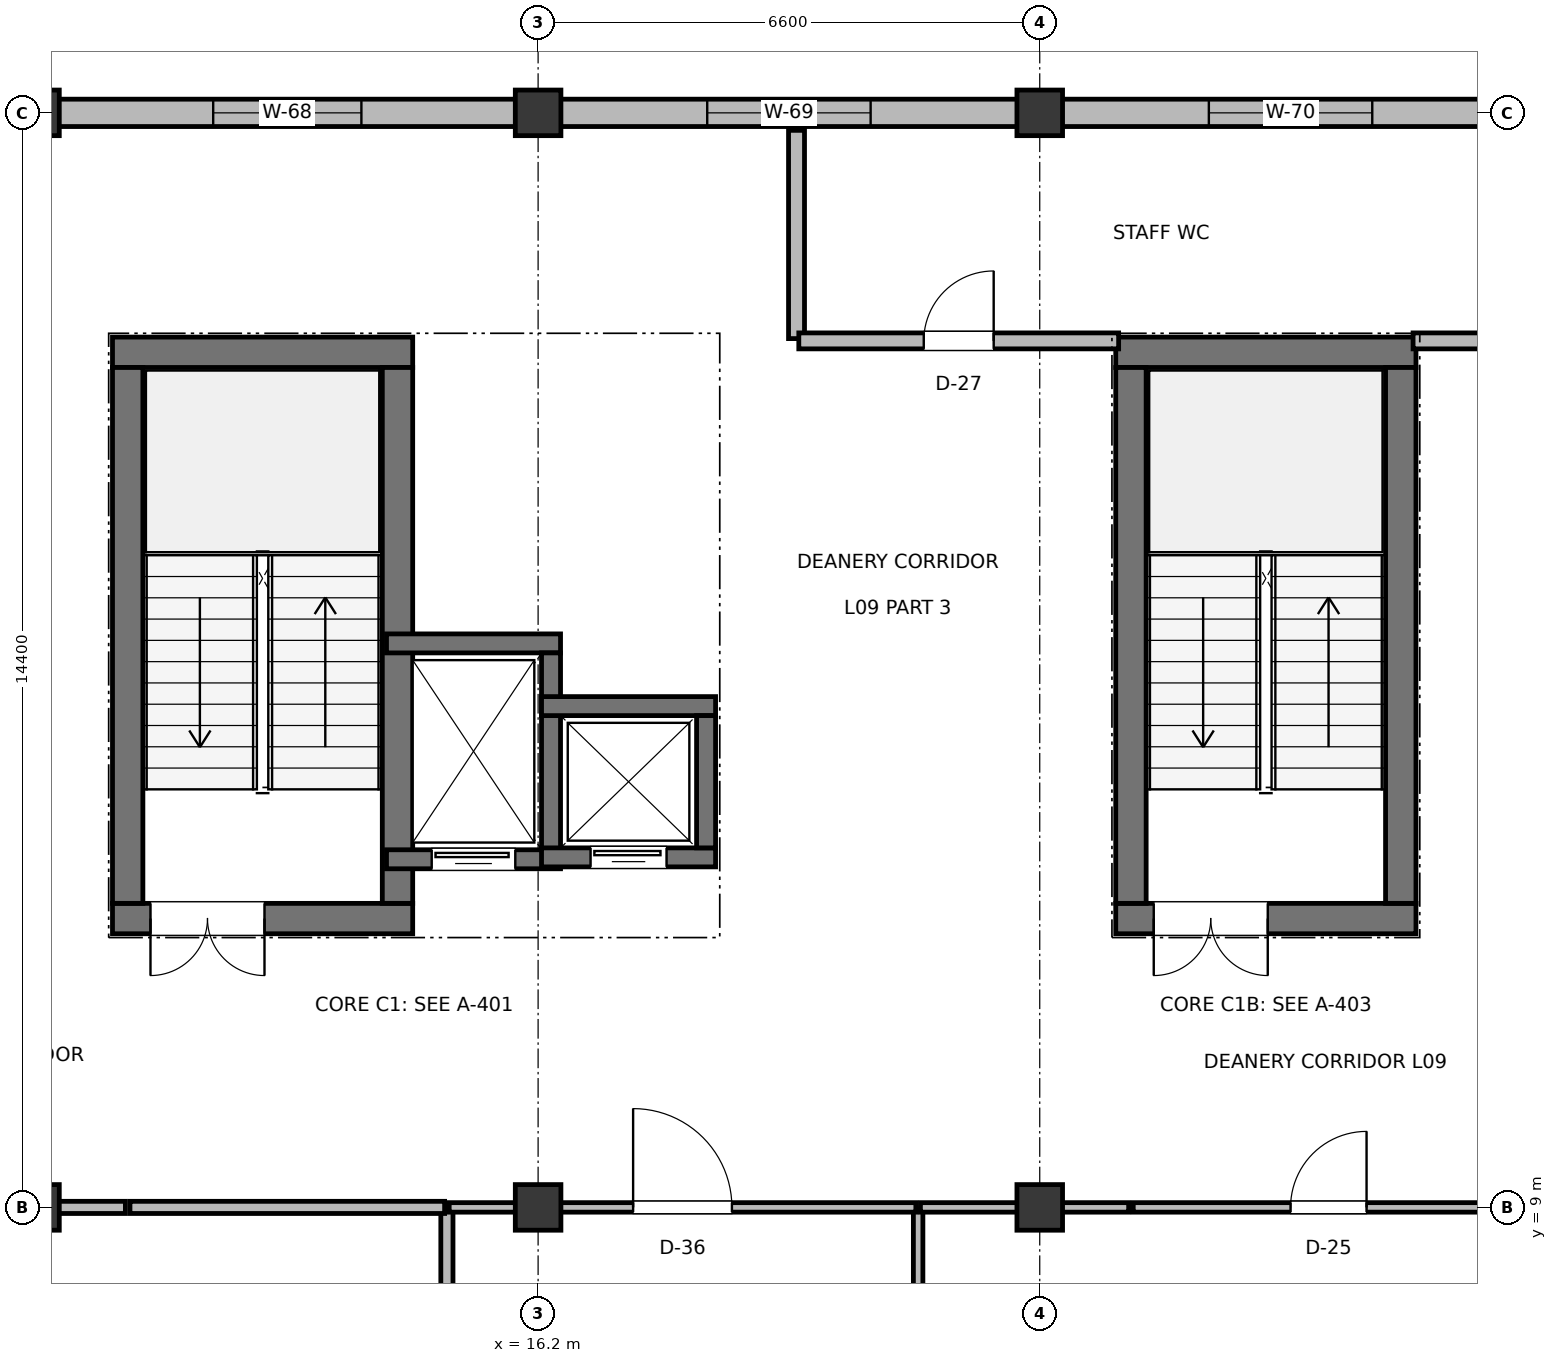
"""IFC4 building model, lengths in metres.
Left out: names, types, materials, properties, quantities, classifications, styles, units other than length and angle.
Written with IfcOpenShell. Run it as: python <this file> out.ifc"""

import sys

from ifc_helpers import new_model, si_unit, direction, frame, frame_2d, origin, origin_2d, place, context, subcontext, project, spatial, rectangle, extrude, element, fill, save


model = new_model("IFC4")
c1 = context("Model", 3, precision=1e-05, world=origin(), true_north=direction((0.0, 1.0)))
c2 = subcontext(c1, "Body", "Model", "MODEL_VIEW")
j1 = project(units=[si_unit("LENGTHUNIT", "METRE"), si_unit("PLANEANGLEUNIT", "RADIAN")], contexts=[c1])
p1 = place(None, origin())
s1 = spatial("IfcSite", under=j1, at=p1, CompositionType="ELEMENT")
p2 = place(p1, origin())
s2 = spatial("IfcBuilding", under=s1, at=p2, CompositionType="ELEMENT")
p3 = place(p2, frame((0.0, 0.0, 40.6)))
s3 = spatial("IfcBuildingStorey", under=s2, at=p3, CompositionType="ELEMENT", Elevation=40.6)
for number, where, z_axis, x_axis in (
    (1, (9.6, 9.0, 0.0), (0.0, 0.0, 1.0), (1.0, 0.0, 0.0)),
    (2, (9.6, 23.4, 0.0), (0.0, 0.0, 1.0), (1.0, 0.0, 0.0)),
    (3, (16.2, 9.0, 0.0), (0.0, 0.0, 1.0), (1.0, 0.0, 0.0)),
    (4, (16.2, 23.4, 0.0), (0.0, 0.0, 1.0), (1.0, 0.0, 0.0)),
    (5, (22.8, 9.0, 0.0), (0.0, 0.0, 1.0), (1.0, 0.0, 0.0)),
    (6, (22.8, 23.4, 0.0), (0.0, 0.0, 1.0), (1.0, 0.0, 0.0)),
):
    element("IfcColumn", number, at=place(p3, frame(where, z_axis=z_axis, x_axis=x_axis)), inside=s3, PredefinedType="COLUMN", context=c2, shape_type="SweptSolid", body=[
        extrude(rectangle(XDim=0.6, YDim=0.6, at=origin_2d()), origin(), (0.0, 0.0, 1.0), 4.0),
    ])
p4 = place(p3, frame((9.885, 23.4, 0.0), z_axis=(0.0, 0.0, 1.0), x_axis=(1.0, 0.0, 0.0)))
e7 = element("IfcWall", 7, at=p4, inside=s3, PredefinedType="SOLIDWALL", context=c2, shape_type="SweptSolid", body=[
    extrude(rectangle(XDim=6.03, YDim=0.36, at=frame_2d((3.015, 0.0))), origin(), (0.0, 0.0, 1.0), 2.995),
])
p5 = place(p4, frame((2.04, 0.0, 0.9)))
e8 = element("IfcOpeningElement", 8, at=p5, cuts=e7, PredefinedType="OPENING", context=c2, shape_type="SweptSolid", body=[
    extrude(rectangle(XDim=1.95, YDim=1.75, at=frame_2d((0.975, 0.875))), frame((0.0, 0.19, 0.0), z_axis=(0.0, -1.0, 0.0), x_axis=(1.0, 0.0, 0.0)), (0.0, 0.0, 1.0), 0.38),
])
p6 = place(p3, frame((16.485, 23.4, 0.0), z_axis=(0.0, 0.0, 1.0), x_axis=(1.0, 0.0, 0.0)))
e9 = element("IfcWall", 9, at=p6, inside=s3, PredefinedType="SOLIDWALL", context=c2, shape_type="SweptSolid", body=[
    extrude(rectangle(XDim=6.03, YDim=0.36, at=frame_2d((3.015, 0.0))), origin(), (0.0, 0.0, 1.0), 2.825),
])
p7 = place(p6, frame((1.94, 0.0, 0.9)))
e10 = element("IfcOpeningElement", 10, at=p7, cuts=e9, PredefinedType="OPENING", context=c2, shape_type="SweptSolid", body=[
    extrude(rectangle(XDim=2.15, YDim=1.15, at=frame_2d((1.075, 0.575))), frame((0.0, 0.19, 0.0), z_axis=(0.0, -1.0, 0.0), x_axis=(1.0, 0.0, 0.0)), (0.0, 0.0, 1.0), 0.38),
])
p8 = place(p3, frame((23.085, 23.4, 0.0), z_axis=(0.0, 0.0, 1.0), x_axis=(1.0, 0.0, 0.0)))
e11 = element("IfcWall", 11, at=p8, inside=s3, PredefinedType="SOLIDWALL", context=c2, shape_type="SweptSolid", body=[
    extrude(rectangle(XDim=6.03, YDim=0.36, at=frame_2d((3.015, 0.0))), origin(), (0.0, 0.0, 1.0), 2.995),
])
p9 = place(p8, frame((1.94, 0.0, 0.9)))
e12 = element("IfcOpeningElement", 12, at=p9, cuts=e11, PredefinedType="OPENING", context=c2, shape_type="SweptSolid", body=[
    extrude(rectangle(XDim=2.15, YDim=1.35, at=frame_2d((1.075, 0.675))), frame((0.0, 0.19, 0.0), z_axis=(0.0, -1.0, 0.0), x_axis=(1.0, 0.0, 0.0)), (0.0, 0.0, 1.0), 0.38),
])
p10 = place(p3, frame((10.6, 12.8, 0.0), z_axis=(0.0, 0.0, 1.0), x_axis=(1.0, 0.0, 0.0)))
e13 = element("IfcWall", 13, at=p10, inside=s3, PredefinedType="SHEAR", context=c2, shape_type="SweptSolid", body=[
    extrude(rectangle(XDim=3.95, YDim=0.4, at=frame_2d((1.975, 0.0))), origin(), (0.0, 0.0, 1.0), 3.78),
])
p11 = place(p10, frame((0.5, 0.0, 0.0)))
e14 = element("IfcOpeningElement", 14, at=p11, cuts=e13, PredefinedType="OPENING", context=c2, shape_type="SweptSolid", body=[
    extrude(rectangle(XDim=1.5, YDim=2.2, at=frame_2d((0.75, 1.1))), frame((0.0, 0.21, 0.0), z_axis=(0.0, -1.0, 0.0), x_axis=(1.0, 0.0, 0.0)), (0.0, 0.0, 1.0), 0.42),
])
p12 = place(p3, frame((10.6, 20.25, 0.0), z_axis=(0.0, 0.0, 1.0), x_axis=(1.0, 0.0, 0.0)))
e15 = element("IfcWall", 15, at=p12, inside=s3, PredefinedType="SHEAR", context=c2, shape_type="SweptSolid", body=[
    extrude(rectangle(XDim=3.95, YDim=0.4, at=frame_2d((1.975, 0.0))), origin(), (0.0, 0.0, 1.0), 3.78),
])
for number, where, z_axis, x_axis in (
    (16, (10.8, 13.0, 0.0), (0.0, 0.0, 1.0), (0.0, 1.0, 0.0)),
    (17, (14.35, 13.0, 0.0), (0.0, 0.0, 1.0), (0.0, 1.0, 0.0)),
):
    element("IfcWall", number, at=place(p3, frame(where, z_axis=z_axis, x_axis=x_axis)), inside=s3, PredefinedType="SHEAR", context=c2, shape_type="SweptSolid", body=[
        extrude(rectangle(XDim=7.05, YDim=0.4, at=frame_2d((3.525, 0.0))), origin(), (0.0, 0.0, 1.0), 3.78),
    ])
p13 = place(p3, frame((14.205, 13.58, 0.0), z_axis=(0.0, 0.0, 1.0), x_axis=(1.0, 0.0, 0.0)))
e18 = element("IfcWall", 18, at=p13, inside=s3, PredefinedType="SHEAR", context=c2, shape_type="SweptSolid", body=[
    extrude(rectangle(XDim=2.29, YDim=0.25, at=frame_2d((1.145, 0.0))), origin(), (0.0, 0.0, 1.0), 3.76),
])
p14 = place(p13, frame((0.595, 0.0, 0.0)))
e19 = element("IfcOpeningElement", 19, at=p14, cuts=e18, PredefinedType="OPENING", context=c2, shape_type="SweptSolid", body=[
    extrude(rectangle(XDim=1.1, YDim=2.2, at=frame_2d((0.55, 1.1))), frame((0.0, 0.135, 0.0), z_axis=(0.0, -1.0, 0.0), x_axis=(1.0, 0.0, 0.0)), (0.0, 0.0, 1.0), 0.27),
])
p15 = place(p3, frame((14.205, 16.42, 0.0), z_axis=(0.0, 0.0, 1.0), x_axis=(1.0, 0.0, 0.0)))
e20 = element("IfcWall", 20, at=p15, inside=s3, PredefinedType="SHEAR", context=c2, shape_type="SweptSolid", body=[
    extrude(rectangle(XDim=2.29, YDim=0.25, at=frame_2d((1.145, 0.0))), origin(), (0.0, 0.0, 1.0), 3.76),
])
p16 = place(p3, frame((16.37, 13.705, 0.0), z_axis=(0.0, 0.0, 1.0), x_axis=(0.0, 1.0, 0.0)))
e21 = element("IfcWall", 21, at=p16, inside=s3, PredefinedType="SHEAR", context=c2, shape_type="SweptSolid", body=[
    extrude(rectangle(XDim=2.59, YDim=0.25, at=frame_2d((1.295, 0.0))), origin(), (0.0, 0.0, 1.0), 3.76),
])
p17 = place(p3, frame((16.245, 13.605, 0.0), z_axis=(0.0, 0.0, 1.0), x_axis=(1.0, 0.0, 0.0)))
e22 = element("IfcWall", 22, at=p17, inside=s3, PredefinedType="SHEAR", context=c2, shape_type="SweptSolid", body=[
    extrude(rectangle(XDim=2.29, YDim=0.25, at=frame_2d((1.145, 0.0))), origin(), (0.0, 0.0, 1.0), 3.76),
])
p18 = place(p17, frame((0.645, 0.0, 0.0)))
e23 = element("IfcOpeningElement", 23, at=p18, cuts=e22, PredefinedType="OPENING", context=c2, shape_type="SweptSolid", body=[
    extrude(rectangle(XDim=1.0, YDim=2.15, at=frame_2d((0.5, 1.075))), frame((0.0, 0.135, 0.0), z_axis=(0.0, -1.0, 0.0), x_axis=(1.0, 0.0, 0.0)), (0.0, 0.0, 1.0), 0.27),
])
p19 = place(p3, frame((16.245, 15.595, 0.0), z_axis=(0.0, 0.0, 1.0), x_axis=(1.0, 0.0, 0.0)))
e24 = element("IfcWall", 24, at=p19, inside=s3, PredefinedType="SHEAR", context=c2, shape_type="SweptSolid", body=[
    extrude(rectangle(XDim=2.29, YDim=0.25, at=frame_2d((1.145, 0.0))), origin(), (0.0, 0.0, 1.0), 3.76),
])
p20 = place(p3, frame((18.41, 13.73, 0.0), z_axis=(0.0, 0.0, 1.0), x_axis=(0.0, 1.0, 0.0)))
e25 = element("IfcWall", 25, at=p20, inside=s3, PredefinedType="SHEAR", context=c2, shape_type="SweptSolid", body=[
    extrude(rectangle(XDim=1.74, YDim=0.25, at=frame_2d((0.87, 0.0))), origin(), (0.0, 0.0, 1.0), 3.76),
])
p21 = place(p3, frame((23.8, 12.8, 0.0), z_axis=(0.0, 0.0, 1.0), x_axis=(1.0, 0.0, 0.0)))
e26 = element("IfcWall", 26, at=p21, inside=s3, PredefinedType="SHEAR", context=c2, shape_type="SweptSolid", body=[
    extrude(rectangle(XDim=3.95, YDim=0.4, at=frame_2d((1.975, 0.0))), origin(), (0.0, 0.0, 1.0), 3.78),
])
p22 = place(p21, frame((0.5, 0.0, 0.0)))
e27 = element("IfcOpeningElement", 27, at=p22, cuts=e26, PredefinedType="OPENING", context=c2, shape_type="SweptSolid", body=[
    extrude(rectangle(XDim=1.5, YDim=2.2, at=frame_2d((0.75, 1.1))), frame((0.0, 0.21, 0.0), z_axis=(0.0, -1.0, 0.0), x_axis=(1.0, 0.0, 0.0)), (0.0, 0.0, 1.0), 0.42),
])
p23 = place(p3, frame((23.8, 20.25, 0.0), z_axis=(0.0, 0.0, 1.0), x_axis=(1.0, 0.0, 0.0)))
e28 = element("IfcWall", 28, at=p23, inside=s3, PredefinedType="SHEAR", context=c2, shape_type="SweptSolid", body=[
    extrude(rectangle(XDim=3.95, YDim=0.4, at=frame_2d((1.975, 0.0))), origin(), (0.0, 0.0, 1.0), 3.78),
])
for number, where, z_axis, x_axis in (
    (29, (24.0, 13.0, 0.0), (0.0, 0.0, 1.0), (0.0, 1.0, 0.0)),
    (30, (27.55, 13.0, 0.0), (0.0, 0.0, 1.0), (0.0, 1.0, 0.0)),
):
    element("IfcWall", number, at=place(p3, frame(where, z_axis=z_axis, x_axis=x_axis)), inside=s3, PredefinedType="SHEAR", context=c2, shape_type="SweptSolid", body=[
        extrude(rectangle(XDim=7.05, YDim=0.4, at=frame_2d((3.525, 0.0))), origin(), (0.0, 0.0, 1.0), 3.78),
    ])
p24 = place(p3, frame((15.0, 3.23, 0.0), z_axis=(0.0, 0.0, 1.0), x_axis=(0.0, 1.0, 0.0)))
e31 = element("IfcWall", 31, at=p24, inside=s3, PredefinedType="PARTITIONING", context=c2, shape_type="SweptSolid", body=[
    extrude(rectangle(XDim=5.74, YDim=0.16, at=frame_2d((2.87, 0.0))), origin(), (0.0, 0.0, 1.0), 2.995),
])
p25 = place(p3, frame((3.23, 9.0, 0.0), z_axis=(0.0, 0.0, 1.0), x_axis=(1.0, 0.0, 0.0)))
e32 = element("IfcWall", 32, at=p25, inside=s3, PredefinedType="PARTITIONING", context=c2, shape_type="SweptSolid", body=[
    extrude(rectangle(XDim=7.54, YDim=0.16, at=frame_2d((3.77, 0.0))), origin(), (0.0, 0.0, 1.0), 2.925),
])
p26 = place(p25, frame((3.145, 0.0, 0.0)))
e33 = element("IfcOpeningElement", 33, at=p26, cuts=e32, PredefinedType="OPENING", context=c2, shape_type="SweptSolid", body=[
    extrude(rectangle(XDim=1.25, YDim=2.2, at=frame_2d((0.625, 1.1))), frame((0.0, 0.09, 0.0), z_axis=(0.0, -1.0, 0.0), x_axis=(1.0, 0.0, 0.0)), (0.0, 0.0, 1.0), 0.18),
])
p27 = place(p3, frame((10.83, 9.0, 0.0), z_axis=(0.0, 0.0, 1.0), x_axis=(1.0, 0.0, 0.0)))
e34 = element("IfcWall", 34, at=p27, inside=s3, PredefinedType="PARTITIONING", context=c2, shape_type="SweptSolid", body=[
    extrude(rectangle(XDim=4.14, YDim=0.16, at=frame_2d((2.07, 0.0))), origin(), (0.0, 0.0, 1.0), 2.995),
])
p28 = place(p3, frame((21.2, 3.23, 0.0), z_axis=(0.0, 0.0, 1.0), x_axis=(0.0, 1.0, 0.0)))
e35 = element("IfcWall", 35, at=p28, inside=s3, PredefinedType="PARTITIONING", context=c2, shape_type="SweptSolid", body=[
    extrude(rectangle(XDim=5.74, YDim=0.125, at=frame_2d((2.87, 0.0))), origin(), (0.0, 0.0, 1.0), 2.885),
])
p29 = place(p3, frame((15.03, 9.0, 0.0), z_axis=(0.0, 0.0, 1.0), x_axis=(1.0, 0.0, 0.0)))
e36 = element("IfcWall", 36, at=p29, inside=s3, PredefinedType="PARTITIONING", context=c2, shape_type="SweptSolid", body=[
    extrude(rectangle(XDim=6.14, YDim=0.125, at=frame_2d((3.07, 0.0))), origin(), (0.0, 0.0, 1.0), 2.885),
])
p30 = place(p29, frame((2.42, 0.0, 0.0)))
e37 = element("IfcOpeningElement", 37, at=p30, cuts=e36, PredefinedType="OPENING", context=c2, shape_type="SweptSolid", body=[
    extrude(rectangle(XDim=1.3, YDim=2.2, at=frame_2d((0.65, 1.1))), frame((0.0, 0.073, 0.0), z_axis=(0.0, -1.0, 0.0), x_axis=(1.0, 0.0, 0.0)), (0.0, 0.0, 1.0), 0.145),
])
p31 = place(p3, frame((24.03, 9.0, 0.0), z_axis=(0.0, 0.0, 1.0), x_axis=(1.0, 0.0, 0.0)))
e38 = element("IfcWall", 38, at=p31, inside=s3, PredefinedType="PARTITIONING", context=c2, shape_type="SweptSolid", body=[
    extrude(rectangle(XDim=5.14, YDim=0.125, at=frame_2d((2.57, 0.0))), origin(), (0.0, 0.0, 1.0), 2.995),
])
p32 = place(p31, frame((2.07, 0.0, 0.0)))
e39 = element("IfcOpeningElement", 39, at=p32, cuts=e38, PredefinedType="OPENING", context=c2, shape_type="SweptSolid", body=[
    extrude(rectangle(XDim=1.0, YDim=2.15, at=frame_2d((0.5, 1.075))), frame((0.0, 0.073, 0.0), z_axis=(0.0, -1.0, 0.0), x_axis=(1.0, 0.0, 0.0)), (0.0, 0.0, 1.0), 0.145),
])
p33 = place(p3, frame((21.23, 9.0, 0.0), z_axis=(0.0, 0.0, 1.0), x_axis=(1.0, 0.0, 0.0)))
e40 = element("IfcWall", 40, at=p33, inside=s3, PredefinedType="PARTITIONING", context=c2, shape_type="SweptSolid", body=[
    extrude(rectangle(XDim=2.74, YDim=0.125, at=frame_2d((1.37, 0.0))), origin(), (0.0, 0.0, 1.0), 2.885),
])
p34 = place(p3, frame((27.712, 20.4, 0.0), z_axis=(0.0, 0.0, 1.0), x_axis=(1.0, 0.0, 0.0)))
e41 = element("IfcWall", 41, at=p34, inside=s3, PredefinedType="PLUMBINGWALL", context=c2, shape_type="SweptSolid", body=[
    extrude(rectangle(XDim=1.458, YDim=0.21, at=frame_2d((0.729, 0.0))), origin(), (0.0, 0.0, 1.0), 2.895),
])
p35 = place(p3, frame((19.6, 20.43, 0.0), z_axis=(0.0, 0.0, 1.0), x_axis=(0.0, 1.0, 0.0)))
e42 = element("IfcWall", 42, at=p35, inside=s3, PredefinedType="PLUMBINGWALL", context=c2, shape_type="SweptSolid", body=[
    extrude(rectangle(XDim=2.74, YDim=0.21, at=frame_2d((1.37, 0.0))), origin(), (0.0, 0.0, 1.0), 2.825),
])
p36 = place(p3, frame((19.63, 20.4, 0.0), z_axis=(0.0, 0.0, 1.0), x_axis=(1.0, 0.0, 0.0)))
e43 = element("IfcWall", 43, at=p36, inside=s3, PredefinedType="PLUMBINGWALL", context=c2, shape_type="SweptSolid", body=[
    extrude(rectangle(XDim=4.208, YDim=0.21, at=frame_2d((2.104, 0.0))), origin(), (0.0, 0.0, 1.0), 2.895),
])
p37 = place(p36, frame((1.644, 0.0, 0.0)))
e44 = element("IfcOpeningElement", 44, at=p37, cuts=e43, PredefinedType="OPENING", context=c2, shape_type="SweptSolid", body=[
    extrude(rectangle(XDim=0.92, YDim=2.1, at=frame_2d((0.46, 1.05))), frame((0.0, 0.115, 0.0), z_axis=(0.0, -1.0, 0.0), x_axis=(1.0, 0.0, 0.0)), (0.0, 0.0, 1.0), 0.23),
])
p38 = place(p5, origin())
e45 = element("IfcWindow", 45, at=p38, inside=s3, PartitioningType="DOUBLE_PANEL_VERTICAL", PredefinedType="WINDOW", context=c2, shape_type="SweptSolid", body=[
    extrude(rectangle(XDim=1.95, YDim=1.75, at=frame_2d((0.975, 0.875))), frame((0.0, 0.03, 0.0), z_axis=(0.0, -1.0, 0.0), x_axis=(1.0, 0.0, 0.0)), (0.0, 0.0, 1.0), 0.06),
])
fill(e8, e45)
p39 = place(p7, origin())
e46 = element("IfcWindow", 46, at=p39, inside=s3, PartitioningType="DOUBLE_PANEL_VERTICAL", PredefinedType="WINDOW", context=c2, shape_type="SweptSolid", body=[
    extrude(rectangle(XDim=2.15, YDim=1.15, at=frame_2d((1.075, 0.575))), frame((0.0, 0.03, 0.0), z_axis=(0.0, -1.0, 0.0), x_axis=(1.0, 0.0, 0.0)), (0.0, 0.0, 1.0), 0.06),
])
fill(e10, e46)
p40 = place(p9, origin())
e47 = element("IfcWindow", 47, at=p40, inside=s3, PartitioningType="DOUBLE_PANEL_VERTICAL", PredefinedType="WINDOW", context=c2, shape_type="SweptSolid", body=[
    extrude(rectangle(XDim=2.15, YDim=1.35, at=frame_2d((1.075, 0.675))), frame((0.0, 0.03, 0.0), z_axis=(0.0, -1.0, 0.0), x_axis=(1.0, 0.0, 0.0)), (0.0, 0.0, 1.0), 0.06),
])
fill(e12, e47)
p41 = place(p11, frame((1.5, 0.0, 0.0), z_axis=(0.0, 0.0, 1.0), x_axis=(-1.0, 0.0, 0.0)))
e48 = element("IfcDoor", 48, at=p41, inside=s3, OperationType="DOUBLE_DOOR_SINGLE_SWING", PredefinedType="DOOR", context=c2, shape_type="SweptSolid", body=[
    extrude(rectangle(XDim=1.5, YDim=2.2, at=frame_2d((0.75, 1.1))), frame((0.0, 0.025, 0.0), z_axis=(0.0, -1.0, 0.0), x_axis=(1.0, 0.0, 0.0)), (0.0, 0.0, 1.0), 0.05),
])
fill(e14, e48)
p42 = place(p14, frame((1.1, 0.0, 0.0), z_axis=(0.0, 0.0, 1.0), x_axis=(-1.0, 0.0, 0.0)))
e49 = element("IfcDoor", 49, at=p42, inside=s3, OperationType="SLIDING_TO_LEFT", PredefinedType="DOOR", context=c2, shape_type="SweptSolid", body=[
    extrude(rectangle(XDim=1.1, YDim=2.2, at=frame_2d((0.55, 1.1))), frame((0.0, 0.025, 0.0), z_axis=(0.0, -1.0, 0.0), x_axis=(1.0, 0.0, 0.0)), (0.0, 0.0, 1.0), 0.05),
])
fill(e19, e49)
p43 = place(p18, frame((1.0, 0.0, 0.0), z_axis=(0.0, 0.0, 1.0), x_axis=(-1.0, 0.0, 0.0)))
e50 = element("IfcDoor", 50, at=p43, inside=s3, OperationType="SLIDING_TO_LEFT", PredefinedType="DOOR", context=c2, shape_type="SweptSolid", body=[
    extrude(rectangle(XDim=1.0, YDim=2.15, at=frame_2d((0.5, 1.075))), frame((0.0, 0.025, 0.0), z_axis=(0.0, -1.0, 0.0), x_axis=(1.0, 0.0, 0.0)), (0.0, 0.0, 1.0), 0.05),
])
fill(e23, e50)
p44 = place(p22, frame((1.5, 0.0, 0.0), z_axis=(0.0, 0.0, 1.0), x_axis=(-1.0, 0.0, 0.0)))
e51 = element("IfcDoor", 51, at=p44, inside=s3, OperationType="DOUBLE_DOOR_SINGLE_SWING", PredefinedType="DOOR", context=c2, shape_type="SweptSolid", body=[
    extrude(rectangle(XDim=1.5, YDim=2.2, at=frame_2d((0.75, 1.1))), frame((0.0, 0.025, 0.0), z_axis=(0.0, -1.0, 0.0), x_axis=(1.0, 0.0, 0.0)), (0.0, 0.0, 1.0), 0.05),
])
fill(e27, e51)
p45 = place(p30, origin())
e52 = element("IfcDoor", 52, at=p45, inside=s3, OperationType="SINGLE_SWING_LEFT", PredefinedType="DOOR", context=c2, shape_type="SweptSolid", body=[
    extrude(rectangle(XDim=1.3, YDim=2.2, at=frame_2d((0.65, 1.1))), frame((0.0, 0.025, 0.0), z_axis=(0.0, -1.0, 0.0), x_axis=(1.0, 0.0, 0.0)), (0.0, 0.0, 1.0), 0.05),
])
fill(e37, e52)
p46 = place(p32, origin())
e53 = element("IfcDoor", 53, at=p46, inside=s3, OperationType="SINGLE_SWING_RIGHT", PredefinedType="DOOR", context=c2, shape_type="SweptSolid", body=[
    extrude(rectangle(XDim=1.0, YDim=2.15, at=frame_2d((0.5, 1.075))), frame((0.0, 0.025, 0.0), z_axis=(0.0, -1.0, 0.0), x_axis=(1.0, 0.0, 0.0)), (0.0, 0.0, 1.0), 0.05),
])
fill(e39, e53)
p47 = place(p37, origin())
e54 = element("IfcDoor", 54, at=p47, inside=s3, OperationType="SINGLE_SWING_RIGHT", PredefinedType="DOOR", context=c2, shape_type="SweptSolid", body=[
    extrude(rectangle(XDim=0.92, YDim=2.1, at=frame_2d((0.46, 1.05))), frame((0.0, 0.025, 0.0), z_axis=(0.0, -1.0, 0.0), x_axis=(1.0, 0.0, 0.0)), (0.0, 0.0, 1.0), 0.05),
])
fill(e44, e54)
save(model, sys.argv[1])
